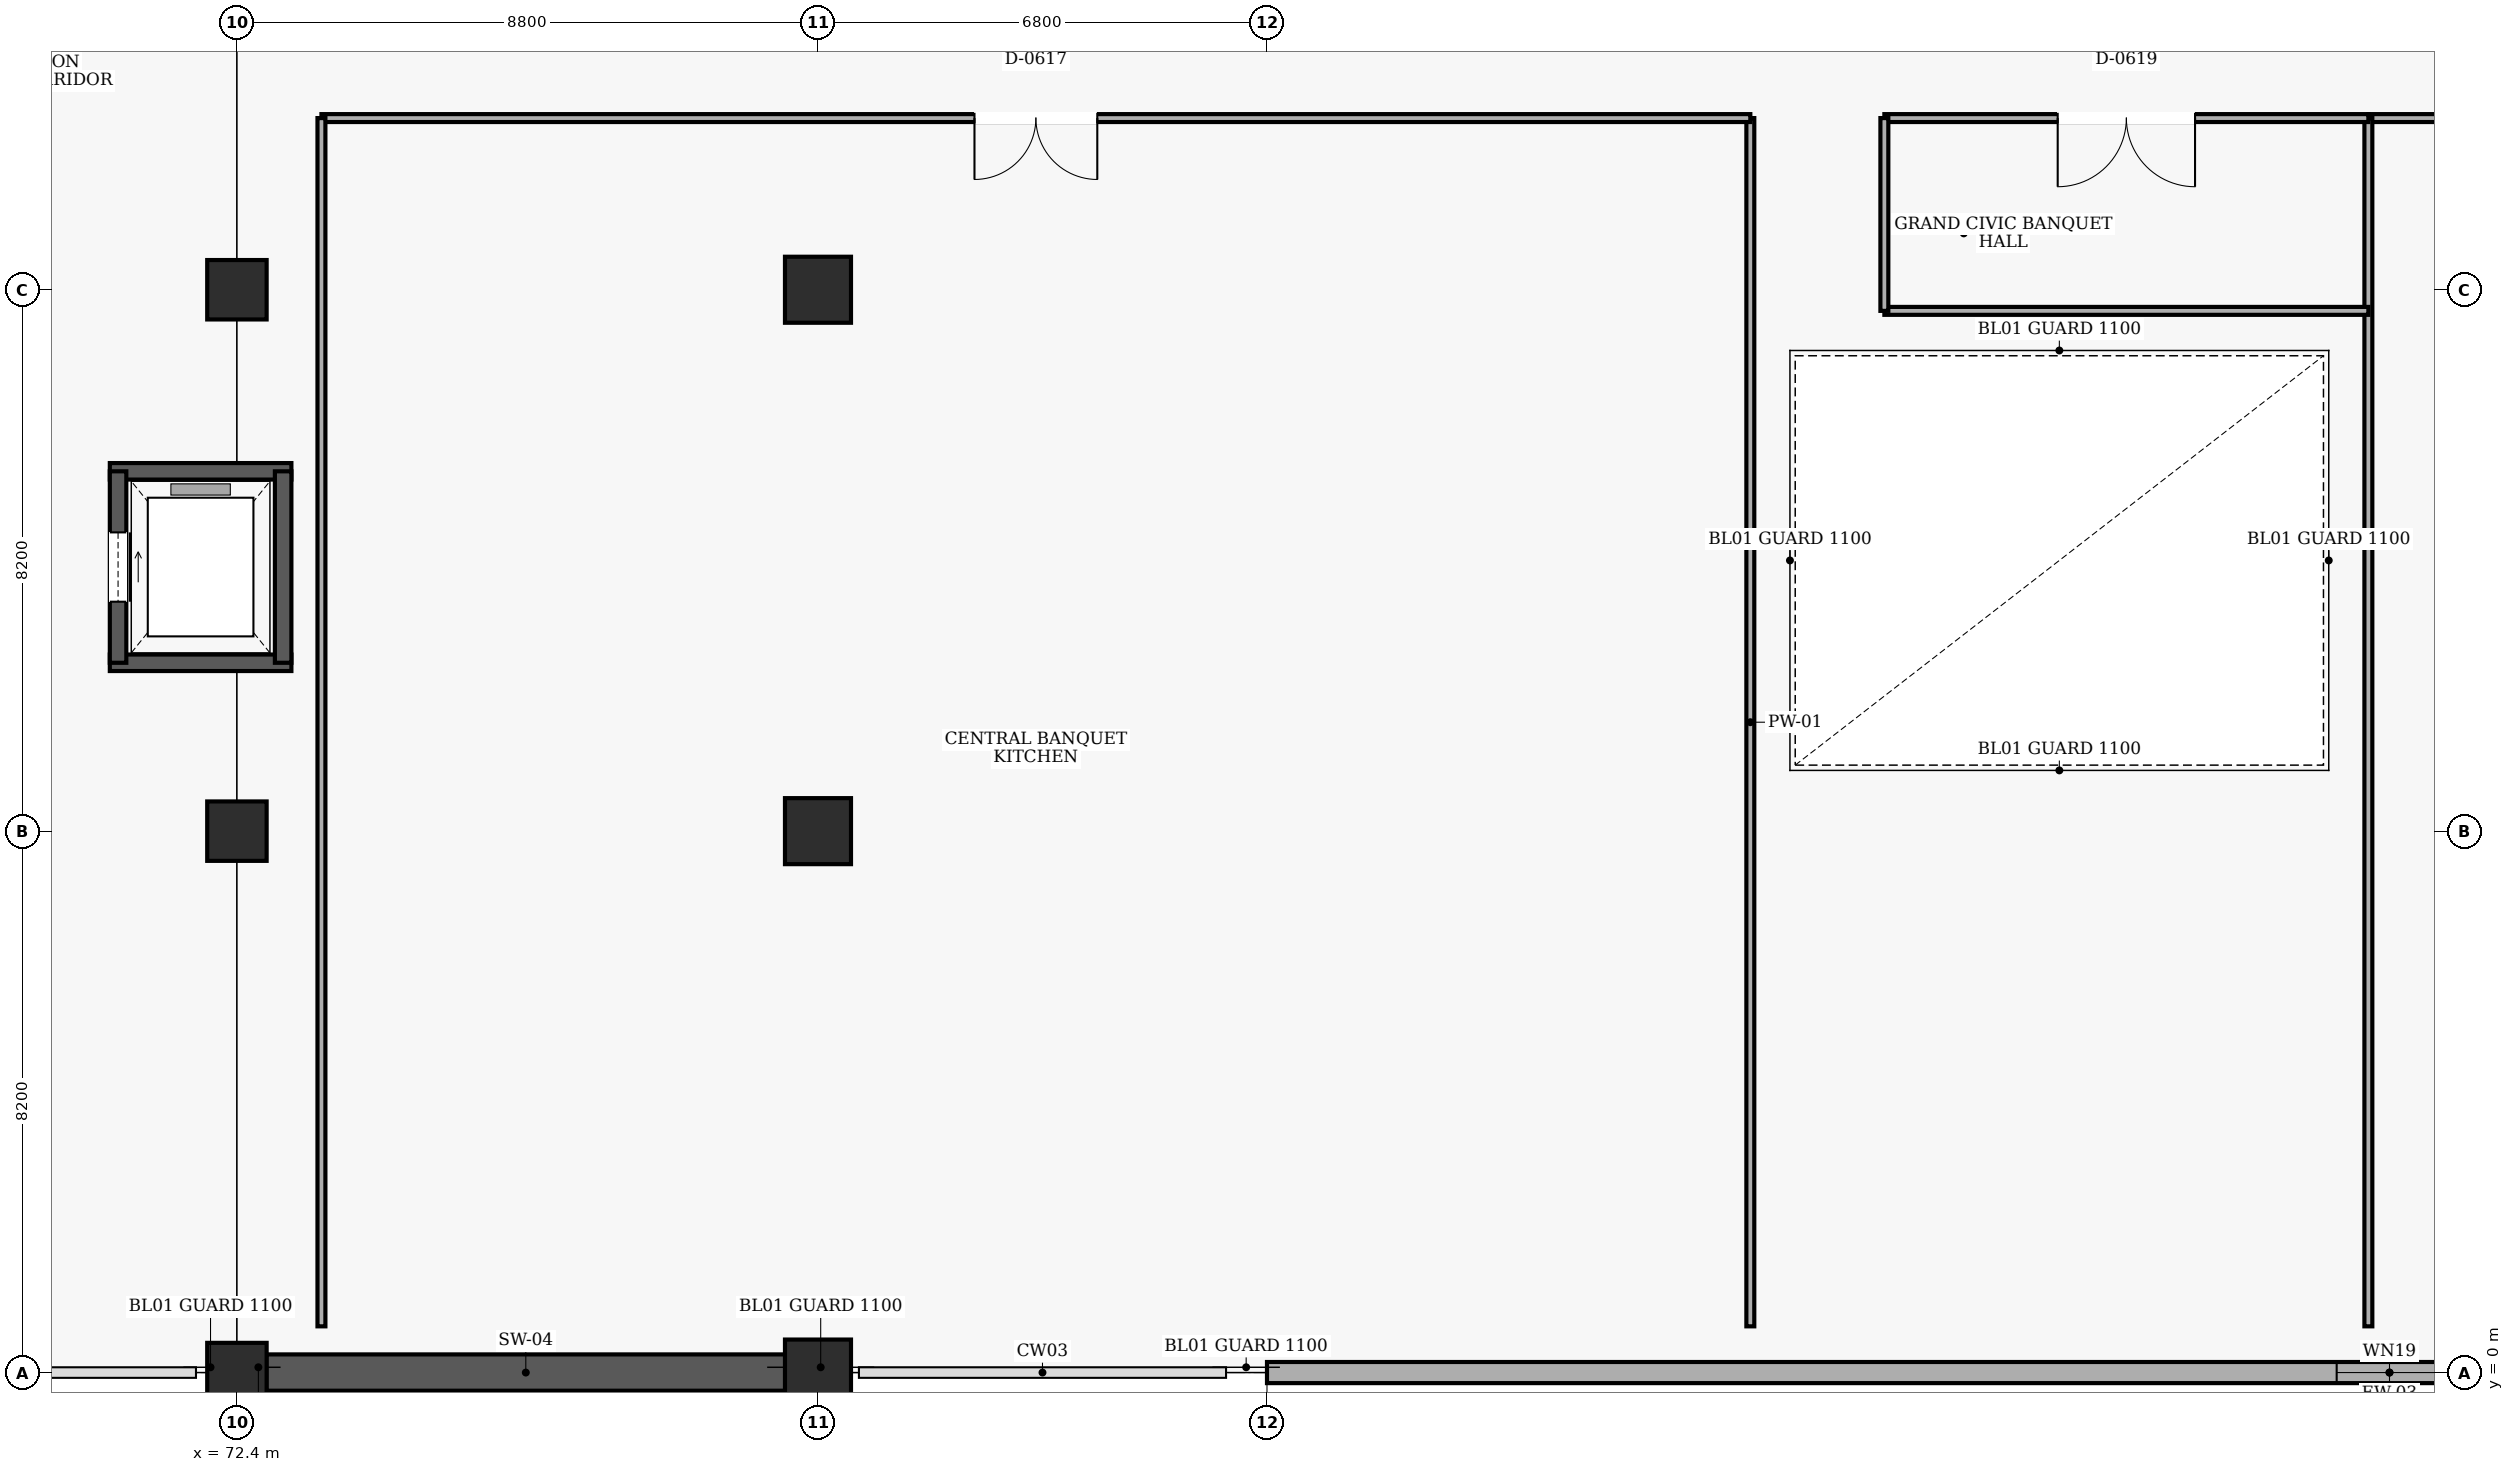
"""IFC4 building model, lengths in metres.
Left out: names, types, materials, properties, quantities, classifications, styles, units other than length and angle.
Written with IfcOpenShell. Run it as: python <this file> out.ifc"""

import sys

from ifc_helpers import new_model, si_unit, direction, frame, frame_2d, origin, origin_2d, place, context, subcontext, project, spatial, rectangle, extrude, element, fill, save


model = new_model("IFC4")
c1 = context("Model", 3, precision=1e-05, world=origin(), true_north=direction((0.0, 1.0)))
c2 = subcontext(c1, "Body", "Model", "MODEL_VIEW")
j1 = project(units=[si_unit("LENGTHUNIT", "METRE"), si_unit("PLANEANGLEUNIT", "RADIAN")], contexts=[c1])
p1 = place(None, origin())
s1 = spatial("IfcSite", under=j1, at=p1, CompositionType="ELEMENT")
p2 = place(p1, origin())
s2 = spatial("IfcBuilding", under=s1, at=p2, CompositionType="ELEMENT")
p3 = place(p2, frame((0.0, 0.0, 10.2)))
s3 = spatial("IfcBuildingStorey", under=s2, at=p3, CompositionType="ELEMENT", Elevation=10.2)
for number, where, z_axis, x_axis in (
    (1, (72.4, 0.0, 0.0), (0.0, 0.0, 1.0), (1.0, 0.0, 0.0)),
    (2, (72.4, 8.2, 0.0), (0.0, 0.0, 1.0), (1.0, 0.0, 0.0)),
    (3, (72.4, 16.4, 0.0), (0.0, 0.0, 1.0), (1.0, 0.0, 0.0)),
):
    element("IfcColumn", number, at=place(p3, frame(where, z_axis=z_axis, x_axis=x_axis)), inside=s3, PredefinedType="COLUMN", context=c2, shape_type="SweptSolid", body=[
        extrude(rectangle(XDim=0.9, YDim=0.9, at=origin_2d()), origin(), (0.0, 0.0, 1.0), 4.8),
    ])
for number, where, z_axis, x_axis in (
    (4, (81.2, 0.0, 0.0), (0.0, 0.0, 1.0), (1.0, 0.0, 0.0)),
    (5, (81.2, 8.2, 0.0), (0.0, 0.0, 1.0), (1.0, 0.0, 0.0)),
    (6, (81.2, 16.4, 0.0), (0.0, 0.0, 1.0), (1.0, 0.0, 0.0)),
):
    element("IfcColumn", number, at=place(p3, frame(where, z_axis=z_axis, x_axis=x_axis)), inside=s3, PredefinedType="COLUMN", context=c2, shape_type="SweptSolid", body=[
        extrude(rectangle(XDim=1.0, YDim=1.0, at=origin_2d()), origin(), (0.0, 0.0, 1.0), 4.8),
    ])
p4 = place(p3, frame((122.0, 0.0, 0.0), z_axis=(0.0, 0.0, 1.0), x_axis=(-1.0, 0.0, 0.0)))
e7 = element("IfcWall", 7, at=p4, inside=s3, PredefinedType="SOLIDWALL", context=c2, shape_type="SweptSolid", body=[
    extrude(rectangle(XDim=34.0, YDim=0.32, at=frame_2d((17.0, 0.0))), origin(), (0.0, 0.0, 1.0), 4.48),
])
p5 = place(p4, frame((16.2, 0.0, 0.9)))
e8 = element("IfcOpeningElement", 8, at=p5, cuts=e7, PredefinedType="OPENING", context=c2, shape_type="SweptSolid", body=[
    extrude(rectangle(XDim=1.6, YDim=2.4, at=frame_2d((0.8, 1.2))), frame((0.0, 0.17, 0.0), z_axis=(0.0, -1.0, 0.0), x_axis=(1.0, 0.0, 0.0)), (0.0, 0.0, 1.0), 0.34),
])
p6 = place(p3, frame((80.705, 0.0, 0.0), z_axis=(0.0, 0.0, 1.0), x_axis=(-1.0, 0.0, 0.0)))
e9 = element("IfcWall", 9, at=p6, inside=s3, PredefinedType="SHEAR", context=c2, shape_type="SweptSolid", body=[
    extrude(rectangle(XDim=7.86, YDim=0.55, at=frame_2d((3.93, 0.0))), origin(), (0.0, 0.0, 1.0), 3.86),
])
for number, where, z_axis, x_axis in (
    (10, (70.475, 10.75, 0.0), (0.0, 0.0, 1.0), (1.0, 0.0, 0.0)),
    (11, (73.225, 13.65, 0.0), (0.0, 0.0, 1.0), (-1.0, 0.0, 0.0)),
):
    element("IfcWall", number, at=place(p3, frame(where, z_axis=z_axis, x_axis=x_axis)), inside=s3, PredefinedType="SHEAR", context=c2, shape_type="SweptSolid", body=[
        extrude(rectangle(XDim=2.75, YDim=0.25, at=frame_2d((1.375, 0.0))), origin(), (0.0, 0.0, 1.0), 4.48),
    ])
p7 = place(p3, frame((70.6, 13.65, 0.0), z_axis=(0.0, 0.0, 1.0), x_axis=(0.0, -1.0, 0.0)))
e12 = element("IfcWall", 12, at=p7, inside=s3, PredefinedType="SHEAR", context=c2, shape_type="SweptSolid", body=[
    extrude(rectangle(XDim=2.9, YDim=0.25, at=frame_2d((1.45, 0.0))), origin(), (0.0, 0.0, 1.0), 4.48),
])
p8 = place(p7, frame((0.925, 0.0, 0.0)))
e13 = element("IfcOpeningElement", 13, at=p8, cuts=e12, PredefinedType="OPENING", context=c2, shape_type="SweptSolid", body=[
    extrude(rectangle(XDim=1.05, YDim=2.15, at=frame_2d((0.525, 1.075))), frame((0.0, 0.135, 0.0), z_axis=(0.0, -1.0, 0.0), x_axis=(1.0, 0.0, 0.0)), (0.0, 0.0, 1.0), 0.27),
])
p9 = place(p3, frame((73.1, 10.75, 0.0), z_axis=(0.0, 0.0, 1.0), x_axis=(0.0, 1.0, 0.0)))
e14 = element("IfcWall", 14, at=p9, inside=s3, PredefinedType="SHEAR", context=c2, shape_type="SweptSolid", body=[
    extrude(rectangle(XDim=2.9, YDim=0.25, at=frame_2d((1.45, 0.0))), origin(), (0.0, 0.0, 1.0), 4.48),
])
p10 = place(p3, frame((95.32, 0.7, 0.0), z_axis=(0.0, 0.0, 1.0), x_axis=(0.0, 1.0, 0.0)))
e15 = element("IfcWall", 15, at=p10, inside=s3, PredefinedType="PARTITIONING", context=c2, shape_type="SweptSolid", body=[
    extrude(rectangle(XDim=18.3, YDim=0.12, at=frame_2d((9.15, 0.0))), origin(), (0.0, 0.0, 1.0), 4.48),
])
p11 = place(p3, frame((95.32, 19.0, 0.0), z_axis=(0.0, 0.0, 1.0), x_axis=(-1.0, 0.0, 0.0)))
e16 = element("IfcWall", 16, at=p11, inside=s3, PredefinedType="PARTITIONING", context=c2, shape_type="SweptSolid", body=[
    extrude(rectangle(XDim=21.64, YDim=0.12, at=frame_2d((10.82, 0.0))), origin(), (0.0, 0.0, 1.0), 4.48),
])
p12 = place(p11, frame((9.89, 0.0, 0.0)))
e17 = element("IfcOpeningElement", 17, at=p12, cuts=e16, PredefinedType="OPENING", context=c2, shape_type="SweptSolid", body=[
    extrude(rectangle(XDim=1.86, YDim=2.3, at=frame_2d((0.93, 1.15))), frame((0.0, 0.07, 0.0), z_axis=(0.0, -1.0, 0.0), x_axis=(1.0, 0.0, 0.0)), (0.0, 0.0, 1.0), 0.14),
])
p13 = place(p3, frame((73.68, 19.0, 0.0), z_axis=(0.0, 0.0, 1.0), x_axis=(0.0, -1.0, 0.0)))
e18 = element("IfcWall", 18, at=p13, inside=s3, PredefinedType="PARTITIONING", context=c2, shape_type="SweptSolid", body=[
    extrude(rectangle(XDim=18.3, YDim=0.12, at=frame_2d((9.15, 0.0))), origin(), (0.0, 0.0, 1.0), 4.48),
])
p14 = place(p3, frame((121.73, 19.0, 0.0), z_axis=(0.0, 0.0, 1.0), x_axis=(-1.0, 0.0, 0.0)))
e19 = element("IfcWall", 19, at=p14, inside=s3, PredefinedType="PARTITIONING", context=c2, shape_type="SweptSolid", body=[
    extrude(rectangle(XDim=17.05, YDim=0.12, at=frame_2d((8.525, 0.0))), origin(), (0.0, 0.0, 1.0), 4.48),
])
p15 = place(p14, frame((7.545, 0.0, 0.0)))
e20 = element("IfcOpeningElement", 20, at=p15, cuts=e19, PredefinedType="OPENING", context=c2, shape_type="SweptSolid", body=[
    extrude(rectangle(XDim=1.96, YDim=2.3, at=frame_2d((0.98, 1.15))), frame((0.0, 0.07, 0.0), z_axis=(0.0, -1.0, 0.0), x_axis=(1.0, 0.0, 0.0)), (0.0, 0.0, 1.0), 0.14),
])
p16 = place(p3, frame((104.68, 19.0, 0.0), z_axis=(0.0, 0.0, 1.0), x_axis=(0.0, -1.0, 0.0)))
e21 = element("IfcWall", 21, at=p16, inside=s3, PredefinedType="PARTITIONING", context=c2, shape_type="SweptSolid", body=[
    extrude(rectangle(XDim=18.3, YDim=0.12, at=frame_2d((9.15, 0.0))), origin(), (0.0, 0.0, 1.0), 4.48),
])
p17 = place(p3, frame((97.35, 16.08, 0.0), z_axis=(0.0, 0.0, 1.0), x_axis=(1.0, 0.0, 0.0)))
e22 = element("IfcWall", 22, at=p17, inside=s3, PredefinedType="PARTITIONING", context=c2, shape_type="SweptSolid", body=[
    extrude(rectangle(XDim=7.33, YDim=0.12, at=frame_2d((3.665, 0.0))), origin(), (0.0, 0.0, 1.0), 4.48),
])
p18 = place(p3, frame((104.68, 19.0, 0.0), z_axis=(0.0, 0.0, 1.0), x_axis=(-1.0, 0.0, 0.0)))
e23 = element("IfcWall", 23, at=p18, inside=s3, PredefinedType="PARTITIONING", context=c2, shape_type="SweptSolid", body=[
    extrude(rectangle(XDim=7.33, YDim=0.12, at=frame_2d((3.665, 0.0))), origin(), (0.0, 0.0, 1.0), 4.48),
])
p19 = place(p18, frame((2.625, 0.0, 0.0)))
e24 = element("IfcOpeningElement", 24, at=p19, cuts=e23, PredefinedType="OPENING", context=c2, shape_type="SweptSolid", body=[
    extrude(rectangle(XDim=2.08, YDim=2.35, at=frame_2d((1.04, 1.175))), frame((0.0, 0.07, 0.0), z_axis=(0.0, -1.0, 0.0), x_axis=(1.0, 0.0, 0.0)), (0.0, 0.0, 1.0), 0.14),
])
p20 = place(p3, frame((97.35, 19.0, 0.0), z_axis=(0.0, 0.0, 1.0), x_axis=(0.0, -1.0, 0.0)))
e25 = element("IfcWall", 25, at=p20, inside=s3, PredefinedType="PARTITIONING", context=c2, shape_type="SweptSolid", body=[
    extrude(rectangle(XDim=2.92, YDim=0.12, at=frame_2d((1.46, 0.0))), origin(), (0.0, 0.0, 1.0), 4.48),
])
p21 = place(p5, origin())
e26 = element("IfcWindow", 26, at=p21, inside=s3, PartitioningType="SINGLE_PANEL", PredefinedType="WINDOW", context=c2, shape_type="SweptSolid", body=[
    extrude(rectangle(XDim=1.6, YDim=2.4, at=frame_2d((0.8, 1.2))), frame((0.0, 0.03, 0.0), z_axis=(0.0, -1.0, 0.0), x_axis=(1.0, 0.0, 0.0)), (0.0, 0.0, 1.0), 0.06),
])
fill(e8, e26)
p22 = place(p8, origin())
e27 = element("IfcDoor", 27, at=p22, inside=s3, OperationType="SLIDING_TO_RIGHT", PredefinedType="DOOR", context=c2, shape_type="SweptSolid", body=[
    extrude(rectangle(XDim=1.05, YDim=2.15, at=frame_2d((0.525, 1.075))), frame((0.0, 0.025, 0.0), z_axis=(0.0, -1.0, 0.0), x_axis=(1.0, 0.0, 0.0)), (0.0, 0.0, 1.0), 0.05),
])
fill(e13, e27)
p23 = place(p12, origin())
e28 = element("IfcDoor", 28, at=p23, inside=s3, OperationType="DOUBLE_DOOR_SINGLE_SWING", PredefinedType="DOOR", context=c2, shape_type="SweptSolid", body=[
    extrude(rectangle(XDim=1.86, YDim=2.3, at=frame_2d((0.93, 1.15))), frame((0.0, 0.025, 0.0), z_axis=(0.0, -1.0, 0.0), x_axis=(1.0, 0.0, 0.0)), (0.0, 0.0, 1.0), 0.05),
])
fill(e17, e28)
p24 = place(p19, origin())
e29 = element("IfcDoor", 29, at=p24, inside=s3, OperationType="DOUBLE_DOOR_SINGLE_SWING", PredefinedType="DOOR", context=c2, shape_type="SweptSolid", body=[
    extrude(rectangle(XDim=2.08, YDim=2.35, at=frame_2d((1.04, 1.175))), frame((0.0, 0.025, 0.0), z_axis=(0.0, -1.0, 0.0), x_axis=(1.0, 0.0, 0.0)), (0.0, 0.0, 1.0), 0.05),
])
fill(e24, e29)
save(model, sys.argv[1])
